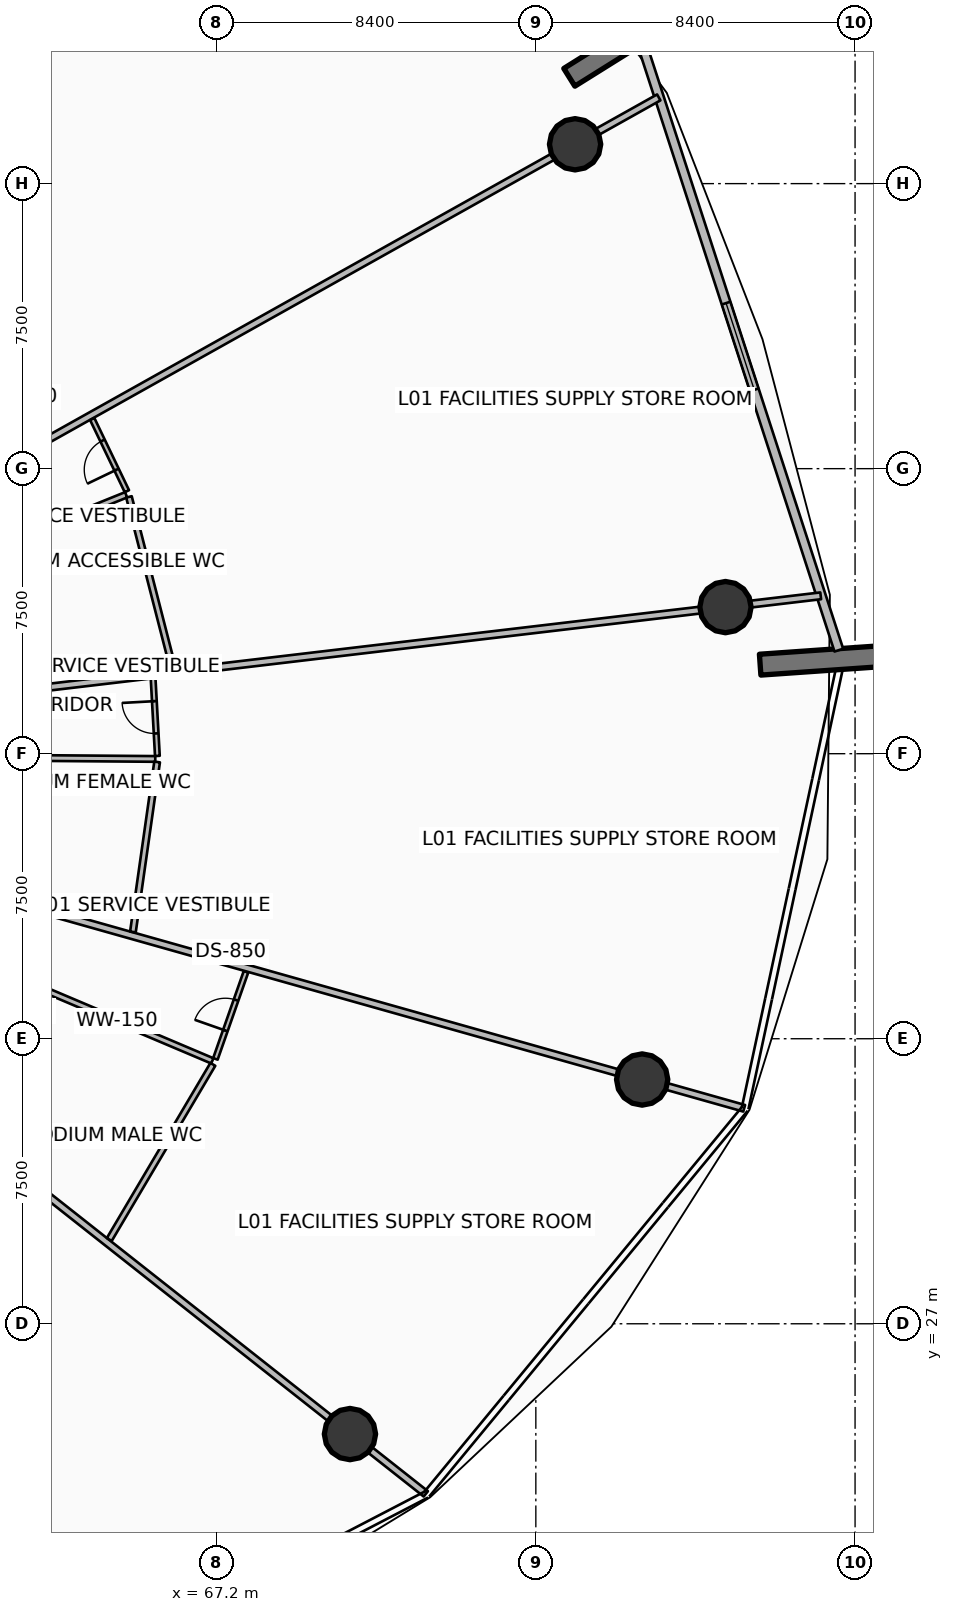
"""IFC4 building model, lengths in metres.
Left out: names, types, materials, properties, quantities, classifications, styles, units other than length and angle.
Written with IfcOpenShell. Run it as: python <this file> out.ifc"""

import sys

from ifc_helpers import new_model, si_unit, direction, frame, frame_2d, origin, origin_2d, place, context, subcontext, project, spatial, rectangle, circle, extrude, element, fill, save


model = new_model("IFC4")
c1 = context("Model", 3, precision=1e-05, world=origin(), true_north=direction((0.0, 1.0)))
c2 = subcontext(c1, "Body", "Model", "MODEL_VIEW")
j1 = project(units=[si_unit("LENGTHUNIT", "METRE"), si_unit("PLANEANGLEUNIT", "RADIAN")], contexts=[c1])
p1 = place(None, origin())
s1 = spatial("IfcSite", under=j1, at=p1, CompositionType="ELEMENT")
p2 = place(p1, origin())
s2 = spatial("IfcBuilding", under=s1, at=p2, CompositionType="ELEMENT")
p3 = place(p2, frame((0.0, 0.0, 7.2)))
s3 = spatial("IfcBuildingStorey", under=s2, at=p3, CompositionType="ELEMENT", Elevation=7.2)
for number, where, z_axis, x_axis in (
    (1, (76.481, 59.797, 0.0), (0.0, 0.0, 1.0), (0.848, 0.53, 0.0)),
    (2, (81.503, 44.343, 0.0), (0.0, 0.0, 1.0), (0.998, 0.07, 0.0)),
):
    element("IfcWall", number, at=place(p3, frame(where, z_axis=z_axis, x_axis=x_axis)), inside=s3, PredefinedType="SOLIDWALL", context=c2, shape_type="SweptSolid", body=[
        extrude(rectangle(XDim=3.5, YDim=0.55, at=frame_2d((1.75, 0.0))), origin(), (0.0, 0.0, 1.0), 4.8),
    ])
for number, where, z_axis, x_axis in (
    (3, (76.633, 58.035, 0.0), (0.0, 0.0, 1.0), (1.0, 0.0, 0.0)),
    (4, (70.709, 24.098, 0.0), (0.0, 0.0, 1.0), (1.0, 0.0, 0.0)),
    (5, (78.398, 33.427, 0.0), (0.0, 0.0, 1.0), (1.0, 0.0, 0.0)),
    (6, (80.59, 45.857, 0.0), (0.0, 0.0, 1.0), (1.0, 0.0, 0.0)),
):
    element("IfcColumn", number, at=place(p3, frame(where, z_axis=z_axis, x_axis=x_axis)), inside=s3, PredefinedType="COLUMN", context=c2, shape_type="SweptSolid", body=[
        extrude(circle(Radius=0.675, at=origin_2d()), origin(), (0.0, 0.0, 1.0), 4.48),
    ])
p4 = place(p3, frame((83.573, 44.725, 0.0), z_axis=(0.0, 0.0, 1.0), x_axis=(-0.309022005354, 0.951054888115, 0.0)))
e7 = element("IfcWall", 7, at=p4, inside=s3, PredefinedType="SOLIDWALL", context=c2, shape_type="SweptSolid", body=[
    extrude(rectangle(XDim=16.803, YDim=0.24, at=frame_2d((8.401, 0.0))), origin(), (0.0, 0.0, 1.0), 3.43),
])
p5 = place(p4, frame((7.201, 0.0, 0.85)))
e8 = element("IfcOpeningElement", 8, at=p5, cuts=e7, PredefinedType="OPENING", context=c2, shape_type="SweptSolid", body=[
    extrude(rectangle(XDim=2.4, YDim=2.1, at=frame_2d((1.2, 1.05))), frame((0.0, 0.13, 0.0), z_axis=(0.0, -1.0, 0.0), x_axis=(1.0, 0.0, 0.0)), (0.0, 0.0, 1.0), 0.26),
])
p6 = place(p3, frame((62.096, 49.894, 0.0), z_axis=(0.0, 0.0, 1.0), x_axis=(0.872490608205, 0.488630881744, 0.0)))
e9 = element("IfcWall", 9, at=p6, inside=s3, PredefinedType="PARTITIONING", context=c2, shape_type="SweptSolid", body=[
    extrude(rectangle(XDim=19.185, YDim=0.18, at=frame_2d((9.592, 0.0))), origin(), (0.0, 0.0, 1.0), 3.693),
])
p7 = place(p3, frame((61.976, 30.982, 0.0), z_axis=(0.0, 0.0, 1.0), x_axis=(0.785315783489, -0.619095404766, 0.0)))
e10 = element("IfcWall", 10, at=p7, inside=s3, PredefinedType="PARTITIONING", context=c2, shape_type="SweptSolid", body=[
    extrude(rectangle(XDim=13.661, YDim=0.18, at=frame_2d((6.831, 0.0))), origin(), (0.0, 0.0, 1.0), 3.693),
])
p8 = place(p3, frame((62.074, 36.041, 0.0), z_axis=(0.0, 0.0, 1.0), x_axis=(0.920841540816, -0.38993699069, 0.0)))
e11 = element("IfcWall", 11, at=p8, inside=s3, PredefinedType="PARTITIONING", context=c2, shape_type="SweptSolid", body=[
    extrude(rectangle(XDim=5.443, YDim=0.15, at=frame_2d((2.722, 0.0))), origin(), (0.0, 0.0, 1.0), 3.92),
])
p9 = place(p3, frame((64.375, 29.217, 0.0), z_axis=(0.0, 0.0, 1.0), x_axis=(0.509047270842, 0.860738564286, 0.0)))
e12 = element("IfcWall", 12, at=p9, inside=s3, PredefinedType="PARTITIONING", context=c2, shape_type="SweptSolid", body=[
    extrude(rectangle(XDim=5.354, YDim=0.15, at=frame_2d((2.677, 0.0))), origin(), (0.0, 0.0, 1.0), 3.693),
])
p10 = place(p3, frame((67.168, 33.97, 0.0), z_axis=(0.0, 0.0, 1.0), x_axis=(0.331316814656, 0.943519564358, 0.0)))
e13 = element("IfcWall", 13, at=p10, inside=s3, PredefinedType="PARTITIONING", context=c2, shape_type="SweptSolid", body=[
    extrude(rectangle(XDim=2.43, YDim=0.125, at=frame_2d((1.215, 0.0))), origin(), (0.0, 0.0, 1.0), 3.693),
])
p11 = place(p10, frame((0.79, 0.0, 0.0)))
e14 = element("IfcOpeningElement", 14, at=p11, cuts=e13, PredefinedType="OPENING", context=c2, shape_type="SweptSolid", body=[
    extrude(rectangle(XDim=0.85, YDim=2.06, at=frame_2d((0.425, 1.03))), frame((0.0, 0.073, 0.0), z_axis=(0.0, -1.0, 0.0), x_axis=(1.0, 0.0, 0.0)), (0.0, 0.0, 1.0), 0.145),
])
p12 = place(p3, frame((62.106, 38.022, 0.0), z_axis=(0.0, 0.0, 1.0), x_axis=(0.962455233657, -0.271440459782, 0.0)))
e15 = element("IfcWall", 15, at=p12, inside=s3, PredefinedType="PARTITIONING", context=c2, shape_type="SweptSolid", body=[
    extrude(rectangle(XDim=19.716, YDim=0.18, at=frame_2d((9.858, 0.0))), origin(), (0.0, 0.0, 1.0), 3.693),
])
p13 = place(p3, frame((62.08, 41.889, 0.0), z_axis=(0.0, 0.0, 1.0), x_axis=(0.999969031596, -0.007869933178, 0.0)))
e16 = element("IfcWall", 16, at=p13, inside=s3, PredefinedType="PARTITIONING", context=c2, shape_type="SweptSolid", body=[
    extrude(rectangle(XDim=3.505, YDim=0.15, at=frame_2d((1.753, 0.0))), origin(), (0.0, 0.0, 1.0), 3.92),
])
p14 = place(p3, frame((64.998, 37.309, 0.0), z_axis=(0.0, 0.0, 1.0), x_axis=(0.140922059176, 0.990020693338, 0.0)))
e17 = element("IfcWall", 17, at=p14, inside=s3, PredefinedType="PARTITIONING", context=c2, shape_type="SweptSolid", body=[
    extrude(rectangle(XDim=4.518, YDim=0.15, at=frame_2d((2.259, 0.0))), origin(), (0.0, 0.0, 1.0), 3.693),
])
p15 = place(p3, frame((65.641, 41.941, 0.0), z_axis=(0.0, 0.0, 1.0), x_axis=(-0.054918793983, 0.998490824228, 0.0)))
e18 = element("IfcWall", 18, at=p15, inside=s3, PredefinedType="PARTITIONING", context=c2, shape_type="SweptSolid", body=[
    extrude(rectangle(XDim=2.036, YDim=0.125, at=frame_2d((1.018, 0.0))), origin(), (0.0, 0.0, 1.0), 3.693),
])
p16 = place(p15, frame((0.593, 0.0, 0.0)))
e19 = element("IfcOpeningElement", 19, at=p16, cuts=e18, PredefinedType="OPENING", context=c2, shape_type="SweptSolid", body=[
    extrude(rectangle(XDim=0.85, YDim=2.06, at=frame_2d((0.425, 1.03))), frame((0.0, 0.073, 0.0), z_axis=(0.0, -1.0, 0.0), x_axis=(1.0, 0.0, 0.0)), (0.0, 0.0, 1.0), 0.145),
])
p17 = place(p3, frame((62.109, 43.67, 0.0), z_axis=(0.0, 0.0, 1.0), x_axis=(0.993068665713, 0.117535633659, 0.0)))
e20 = element("IfcWall", 20, at=p17, inside=s3, PredefinedType="PARTITIONING", context=c2, shape_type="SweptSolid", body=[
    extrude(rectangle(XDim=21.133, YDim=0.18, at=frame_2d((10.566, 0.0))), origin(), (0.0, 0.0, 1.0), 3.693),
])
p18 = place(p3, frame((62.074, 47.701, 0.0), z_axis=(0.0, 0.0, 1.0), x_axis=(0.926852538468, 0.375425587747, 0.0)))
e21 = element("IfcWall", 21, at=p18, inside=s3, PredefinedType="PARTITIONING", context=c2, shape_type="SweptSolid", body=[
    extrude(rectangle(XDim=2.96, YDim=0.15, at=frame_2d((1.48, 0.0))), origin(), (0.0, 0.0, 1.0), 3.92),
])
p19 = place(p3, frame((66.054, 44.237, 0.0), z_axis=(0.0, 0.0, 1.0), x_axis=(-0.248710144761, 0.968577959636, 0.0)))
e22 = element("IfcWall", 22, at=p19, inside=s3, PredefinedType="PARTITIONING", context=c2, shape_type="SweptSolid", body=[
    extrude(rectangle(XDim=4.667, YDim=0.15, at=frame_2d((2.333, 0.0))), origin(), (0.0, 0.0, 1.0), 3.693),
])
p20 = place(p3, frame((64.839, 48.906, 0.0), z_axis=(0.0, 0.0, 1.0), x_axis=(-0.432923235959, 0.901430791446, 0.0)))
e23 = element("IfcWall", 23, at=p20, inside=s3, PredefinedType="PARTITIONING", context=c2, shape_type="SweptSolid", body=[
    extrude(rectangle(XDim=2.106, YDim=0.125, at=frame_2d((1.053, 0.0))), origin(), (0.0, 0.0, 1.0), 3.693),
])
p21 = place(p20, frame((0.628, 0.0, 0.0)))
e24 = element("IfcOpeningElement", 24, at=p21, cuts=e23, PredefinedType="OPENING", context=c2, shape_type="SweptSolid", body=[
    extrude(rectangle(XDim=0.85, YDim=2.06, at=frame_2d((0.425, 1.03))), frame((0.0, 0.073, 0.0), z_axis=(0.0, -1.0, 0.0), x_axis=(1.0, 0.0, 0.0)), (0.0, 0.0, 1.0), 0.145),
])
p22 = place(p5, origin())
e25 = element("IfcWindow", 25, at=p22, inside=s3, PartitioningType="SINGLE_PANEL", PredefinedType="WINDOW", context=c2, shape_type="SweptSolid", body=[
    extrude(rectangle(XDim=2.4, YDim=2.1, at=frame_2d((1.2, 1.05))), frame((0.0, 0.03, 0.0), z_axis=(0.0, -1.0, 0.0), x_axis=(1.0, 0.0, 0.0)), (0.0, 0.0, 1.0), 0.06),
])
fill(e8, e25)
p23 = place(p11, origin())
e26 = element("IfcDoor", 26, at=p23, inside=s3, OperationType="SINGLE_SWING_LEFT", PredefinedType="DOOR", context=c2, shape_type="SweptSolid", body=[
    extrude(rectangle(XDim=0.85, YDim=2.06, at=frame_2d((0.425, 1.03))), frame((0.0, 0.025, 0.0), z_axis=(0.0, -1.0, 0.0), x_axis=(1.0, 0.0, 0.0)), (0.0, 0.0, 1.0), 0.05),
])
fill(e14, e26)
p24 = place(p16, origin())
e27 = element("IfcDoor", 27, at=p24, inside=s3, OperationType="SINGLE_SWING_RIGHT", PredefinedType="DOOR", context=c2, shape_type="SweptSolid", body=[
    extrude(rectangle(XDim=0.85, YDim=2.06, at=frame_2d((0.425, 1.03))), frame((0.0, 0.025, 0.0), z_axis=(0.0, -1.0, 0.0), x_axis=(1.0, 0.0, 0.0)), (0.0, 0.0, 1.0), 0.05),
])
fill(e19, e27)
p25 = place(p21, origin())
e28 = element("IfcDoor", 28, at=p25, inside=s3, OperationType="SINGLE_SWING_LEFT", PredefinedType="DOOR", context=c2, shape_type="SweptSolid", body=[
    extrude(rectangle(XDim=0.85, YDim=2.06, at=frame_2d((0.425, 1.03))), frame((0.0, 0.025, 0.0), z_axis=(0.0, -1.0, 0.0), x_axis=(1.0, 0.0, 0.0)), (0.0, 0.0, 1.0), 0.05),
])
fill(e24, e28)
save(model, sys.argv[1])
